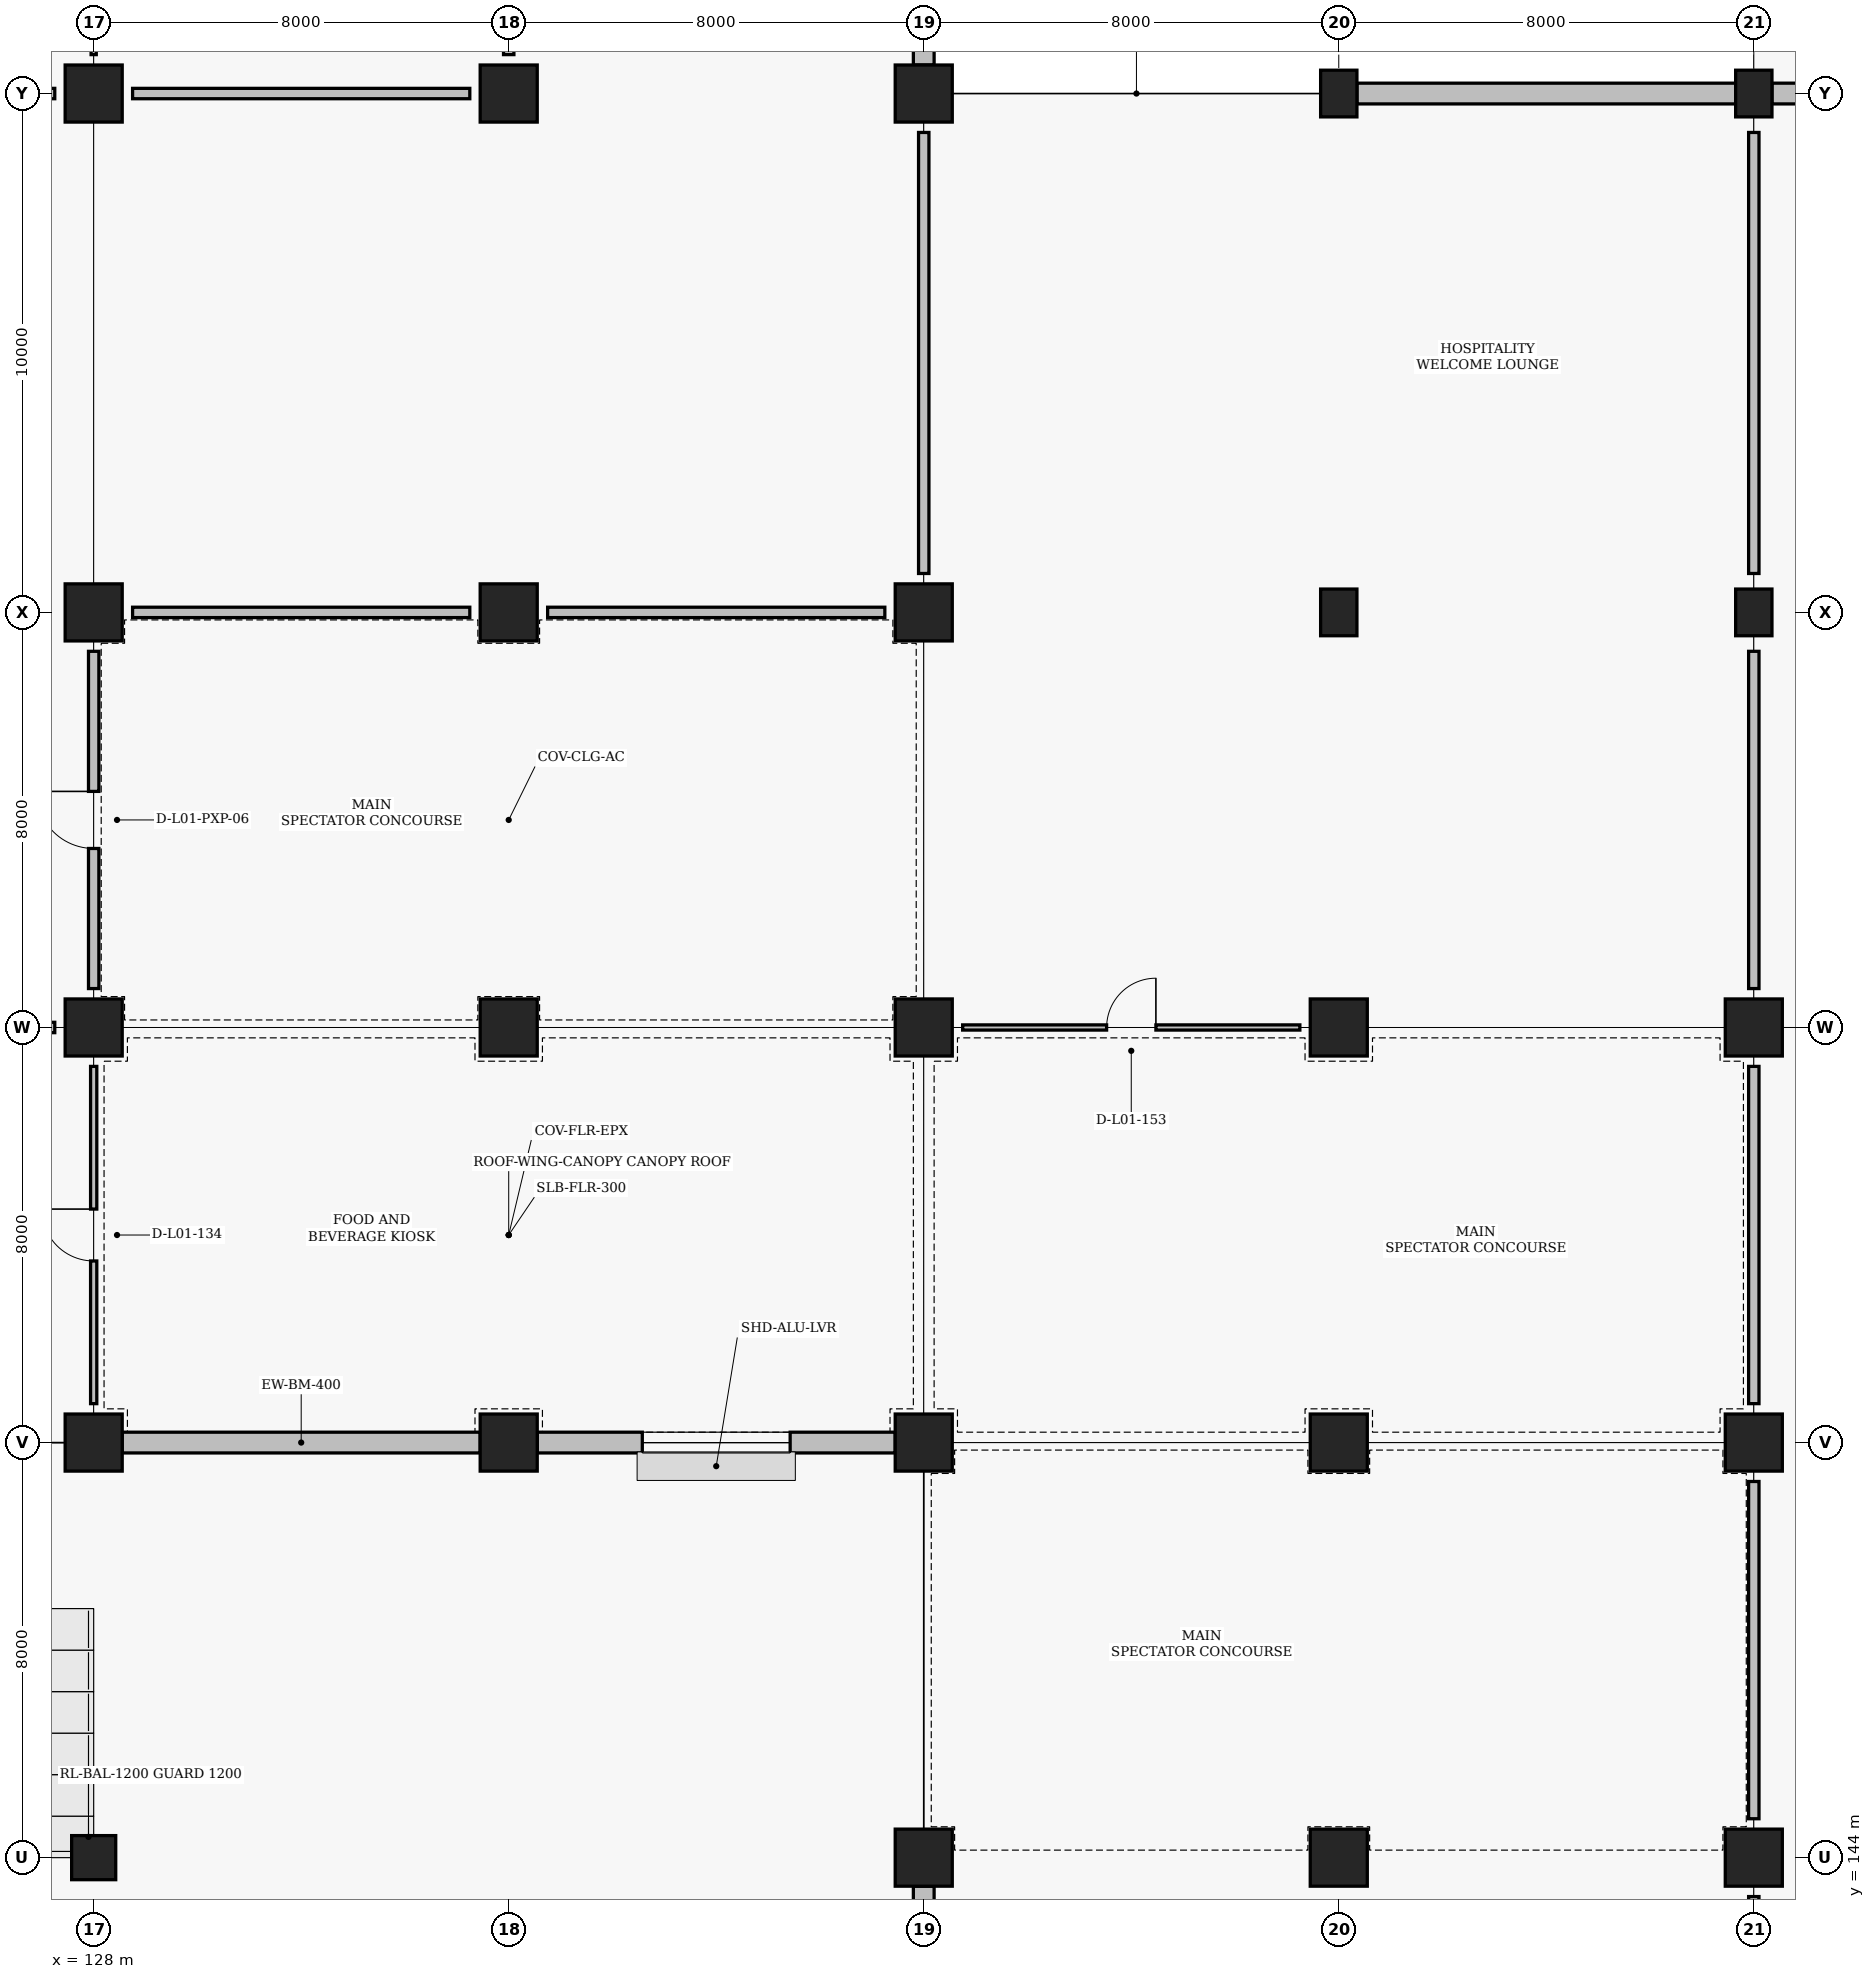
"""IFC4 building model, lengths in metres.
Left out: names, types, materials, properties, quantities, classifications, styles, units other than length and angle.
Written with IfcOpenShell. Run it as: python <this file> out.ifc"""

import sys

from ifc_helpers import new_model, si_unit, direction, frame, frame_2d, origin, origin_2d, place, context, subcontext, project, spatial, rectangle, circle, extrude, element, fill, save


model = new_model("IFC4")
c1 = context("Model", 3, precision=1e-05, world=origin(), true_north=direction((0.0, 1.0)))
c2 = subcontext(c1, "Body", "Model", "MODEL_VIEW")
j1 = project(units=[si_unit("LENGTHUNIT", "METRE"), si_unit("PLANEANGLEUNIT", "RADIAN")], contexts=[c1])
p1 = place(None, origin())
s1 = spatial("IfcSite", under=j1, at=p1, CompositionType="ELEMENT")
p2 = place(p1, origin())
s2 = spatial("IfcBuilding", under=s1, at=p2, CompositionType="ELEMENT")
p3 = place(p2, origin())
s3 = spatial("IfcBuildingStorey", under=s2, at=p3, CompositionType="ELEMENT", Elevation=0.0)
for number, where, z_axis, x_axis in (
    (1, (128.0, 152.0, 0.0), (0.0, 0.0, 1.0), (1.0, 0.0, 0.0)),
    (2, (128.0, 160.0, 0.0), (0.0, 0.0, 1.0), (1.0, 0.0, 0.0)),
    (3, (128.0, 168.0, 0.0), (0.0, 0.0, 1.0), (1.0, 0.0, 0.0)),
    (4, (128.0, 178.0, 0.0), (0.0, 0.0, 1.0), (1.0, 0.0, 0.0)),
    (5, (136.0, 152.0, 0.0), (0.0, 0.0, 1.0), (1.0, 0.0, 0.0)),
    (6, (136.0, 160.0, 0.0), (0.0, 0.0, 1.0), (1.0, 0.0, 0.0)),
    (7, (136.0, 168.0, 0.0), (0.0, 0.0, 1.0), (1.0, 0.0, 0.0)),
    (8, (136.0, 178.0, 0.0), (0.0, 0.0, 1.0), (1.0, 0.0, 0.0)),
    (9, (144.0, 144.0, 0.0), (0.0, 0.0, 1.0), (1.0, 0.0, 0.0)),
    (10, (144.0, 152.0, 0.0), (0.0, 0.0, 1.0), (1.0, 0.0, 0.0)),
    (11, (144.0, 160.0, 0.0), (0.0, 0.0, 1.0), (1.0, 0.0, 0.0)),
    (12, (144.0, 168.0, 0.0), (0.0, 0.0, 1.0), (1.0, 0.0, 0.0)),
    (13, (144.0, 178.0, 0.0), (0.0, 0.0, 1.0), (1.0, 0.0, 0.0)),
    (14, (152.0, 144.0, 0.0), (0.0, 0.0, 1.0), (1.0, 0.0, 0.0)),
    (15, (152.0, 152.0, 0.0), (0.0, 0.0, 1.0), (1.0, 0.0, 0.0)),
    (16, (152.0, 160.0, 0.0), (0.0, 0.0, 1.0), (1.0, 0.0, 0.0)),
):
    element("IfcColumn", number, at=place(p3, frame(where, z_axis=z_axis, x_axis=x_axis)), inside=s3, PredefinedType="COLUMN", context=c2, shape_type="SweptSolid", body=[
        extrude(rectangle(XDim=1.1, YDim=1.1, at=origin_2d()), origin(), (0.0, 0.0, 1.0), 4.8),
    ])
for number, where, z_axis, x_axis in (
    (17, (152.0, 168.0, 0.0), (0.0, 0.0, 1.0), (1.0, 0.0, 0.0)),
    (18, (152.0, 178.0, 0.0), (0.0, 0.0, 1.0), (1.0, 0.0, 0.0)),
):
    element("IfcColumn", number, at=place(p3, frame(where, z_axis=z_axis, x_axis=x_axis)), inside=s3, PredefinedType="COLUMN", context=c2, shape_type="SweptSolid", body=[
        extrude(rectangle(XDim=0.7, YDim=0.9, at=origin_2d()), origin(), (0.0, 0.0, 1.0), 4.8),
    ])
for number, where, z_axis, x_axis in (
    (19, (160.0, 144.0, 0.0), (0.0, 0.0, 1.0), (1.0, 0.0, 0.0)),
    (20, (160.0, 152.0, 0.0), (0.0, 0.0, 1.0), (1.0, 0.0, 0.0)),
    (21, (160.0, 160.0, 0.0), (0.0, 0.0, 1.0), (1.0, 0.0, 0.0)),
):
    element("IfcColumn", number, at=place(p3, frame(where, z_axis=z_axis, x_axis=x_axis)), inside=s3, PredefinedType="COLUMN", context=c2, shape_type="SweptSolid", body=[
        extrude(rectangle(XDim=1.1, YDim=1.1, at=origin_2d()), origin(), (0.0, 0.0, 1.0), 4.8),
    ])
for number, where, z_axis, x_axis in (
    (22, (160.0, 168.0, 0.0), (0.0, 0.0, 1.0), (1.0, 0.0, 0.0)),
    (23, (160.0, 178.0, 0.0), (0.0, 0.0, 1.0), (1.0, 0.0, 0.0)),
):
    element("IfcColumn", number, at=place(p3, frame(where, z_axis=z_axis, x_axis=x_axis)), inside=s3, PredefinedType="COLUMN", context=c2, shape_type="SweptSolid", body=[
        extrude(rectangle(XDim=0.7, YDim=0.9, at=origin_2d()), origin(), (0.0, 0.0, 1.0), 4.8),
    ])
p4 = place(p3, frame((128.0, 144.0, 0.0), z_axis=(0.0, 0.0, 1.0), x_axis=(1.0, 0.0, 0.0)))
e24 = element("IfcColumn", 24, at=p4, inside=s3, PredefinedType="COLUMN", context=c2, shape_type="SweptSolid", body=[
    extrude(circle(Radius=0.425, at=origin_2d()), origin(), (0.0, 0.0, 1.0), 4.8),
])
p5 = place(p3, frame((128.55, 152.0, 0.0), z_axis=(0.0, 0.0, 1.0), x_axis=(1.0, 0.0, 0.0)))
e25 = element("IfcWall", 25, at=p5, inside=s3, PredefinedType="SOLIDWALL", context=c2, shape_type="SweptSolid", body=[
    extrude(rectangle(XDim=6.9, YDim=0.4, at=frame_2d((3.45, 0.0))), origin(), (0.0, 0.0, 1.0), 3.81),
])
p6 = place(p3, frame((136.55, 152.0, 0.0), z_axis=(0.0, 0.0, 1.0), x_axis=(1.0, 0.0, 0.0)))
e26 = element("IfcWall", 26, at=p6, inside=s3, PredefinedType="SOLIDWALL", context=c2, shape_type="SweptSolid", body=[
    extrude(rectangle(XDim=6.9, YDim=0.4, at=frame_2d((3.45, 0.0))), origin(), (0.0, 0.0, 1.0), 3.81),
])
p7 = place(p6, frame((2.025, 0.0, 0.95)))
e27 = element("IfcOpeningElement", 27, at=p7, cuts=e26, PredefinedType="OPENING", context=c2, shape_type="SweptSolid", body=[
    extrude(rectangle(XDim=2.85, YDim=2.1, at=frame_2d((1.425, 1.05))), frame((0.0, 0.21, 0.0), z_axis=(0.0, -1.0, 0.0), x_axis=(1.0, 0.0, 0.0)), (0.0, 0.0, 1.0), 0.42),
])
p8 = place(p3, frame((144.0, 187.7, 0.0), z_axis=(0.0, 0.0, 1.0), x_axis=(0.0, -1.0, 0.0)))
e28 = element("IfcWall", 28, at=p8, inside=s3, PredefinedType="SOLIDWALL", context=c2, shape_type="SweptSolid", body=[
    extrude(rectangle(XDim=9.15, YDim=0.4, at=frame_2d((4.575, 0.0))), origin(), (0.0, 0.0, 1.0), 3.71),
])
p9 = place(p8, frame((3.875, 0.0, 0.0)))
e29 = element("IfcOpeningElement", 29, at=p9, cuts=e28, PredefinedType="OPENING", context=c2, shape_type="SweptSolid", body=[
    extrude(rectangle(XDim=1.4, YDim=2.2, at=frame_2d((0.7, 1.1))), frame((0.0, 0.21, 0.0), z_axis=(0.0, -1.0, 0.0), x_axis=(1.0, 0.0, 0.0)), (0.0, 0.0, 1.0), 0.42),
])
p10 = place(p3, frame((144.0, 136.55, 0.0), z_axis=(0.0, 0.0, 1.0), x_axis=(0.0, 1.0, 0.0)))
e30 = element("IfcWall", 30, at=p10, inside=s3, PredefinedType="SOLIDWALL", context=c2, shape_type="SweptSolid", body=[
    extrude(rectangle(XDim=6.9, YDim=0.4, at=frame_2d((3.45, 0.0))), origin(), (0.0, 0.0, 1.0), 3.66),
])
p11 = place(p3, frame((152.35, 178.0, 0.0), z_axis=(0.0, 0.0, 1.0), x_axis=(1.0, 0.0, 0.0)))
e31 = element("IfcWall", 31, at=p11, inside=s3, PredefinedType="SOLIDWALL", context=c2, shape_type="SweptSolid", body=[
    extrude(rectangle(XDim=7.3, YDim=0.4, at=frame_2d((3.65, 0.0))), origin(), (0.0, 0.0, 1.0), 3.71),
])
p12 = place(p3, frame((160.35, 178.0, 0.0), z_axis=(0.0, 0.0, 1.0), x_axis=(1.0, 0.0, 0.0)))
e32 = element("IfcWall", 32, at=p12, inside=s3, PredefinedType="SOLIDWALL", context=c2, shape_type="SweptSolid", body=[
    extrude(rectangle(XDim=7.3, YDim=0.4, at=frame_2d((3.65, 0.0))), origin(), (0.0, 0.0, 1.0), 3.71),
])
p13 = place(p12, frame((2.95, 0.0, 0.0)))
e33 = element("IfcOpeningElement", 33, at=p13, cuts=e32, PredefinedType="OPENING", context=c2, shape_type="SweptSolid", body=[
    extrude(rectangle(XDim=1.4, YDim=2.2, at=frame_2d((0.7, 1.1))), frame((0.0, 0.21, 0.0), z_axis=(0.0, -1.0, 0.0), x_axis=(1.0, 0.0, 0.0)), (0.0, 0.0, 1.0), 0.42),
])
p14 = place(p3, frame((128.0, 160.75, 0.0), z_axis=(0.0, 0.0, 1.0), x_axis=(0.0, 1.0, 0.0)))
e34 = element("IfcWall", 34, at=p14, inside=s3, PredefinedType="PARTITIONING", context=c2, shape_type="SweptSolid", body=[
    extrude(rectangle(XDim=6.5, YDim=0.2, at=frame_2d((3.25, 0.0))), origin(), (0.0, 0.0, 1.0), 3.81),
])
p15 = place(p14, frame((2.7, 0.0, 0.0)))
e35 = element("IfcOpeningElement", 35, at=p15, cuts=e34, PredefinedType="OPENING", context=c2, shape_type="SweptSolid", body=[
    extrude(rectangle(XDim=1.1, YDim=2.2, at=frame_2d((0.55, 1.1))), frame((0.0, 0.11, 0.0), z_axis=(0.0, -1.0, 0.0), x_axis=(1.0, 0.0, 0.0)), (0.0, 0.0, 1.0), 0.22),
])
p16 = place(p3, frame((120.75, 160.0, 0.0), z_axis=(0.0, 0.0, 1.0), x_axis=(1.0, 0.0, 0.0)))
e36 = element("IfcWall", 36, at=p16, inside=s3, PredefinedType="PARTITIONING", context=c2, shape_type="SweptSolid", body=[
    extrude(rectangle(XDim=6.5, YDim=0.2, at=frame_2d((3.25, 0.0))), origin(), (0.0, 0.0, 1.0), 3.66),
])
for number, where, z_axis, x_axis in (
    (37, (120.75, 178.0, 0.0), (0.0, 0.0, 1.0), (1.0, 0.0, 0.0)),
    (38, (128.75, 168.0, 0.0), (0.0, 0.0, 1.0), (1.0, 0.0, 0.0)),
    (39, (128.75, 178.0, 0.0), (0.0, 0.0, 1.0), (1.0, 0.0, 0.0)),
):
    element("IfcWall", number, at=place(p3, frame(where, z_axis=z_axis, x_axis=x_axis)), inside=s3, PredefinedType="PARTITIONING", context=c2, shape_type="SweptSolid", body=[
        extrude(rectangle(XDim=6.5, YDim=0.2, at=frame_2d((3.25, 0.0))), origin(), (0.0, 0.0, 1.0), 3.91),
    ])
p17 = place(p3, frame((144.0, 168.75, 0.0), z_axis=(0.0, 0.0, 1.0), x_axis=(0.0, 1.0, 0.0)))
e40 = element("IfcWall", 40, at=p17, inside=s3, PredefinedType="PARTITIONING", context=c2, shape_type="SweptSolid", body=[
    extrude(rectangle(XDim=8.5, YDim=0.2, at=frame_2d((4.25, 0.0))), origin(), (0.0, 0.0, 1.0), 3.71),
])
p18 = place(p3, frame((136.75, 168.0, 0.0), z_axis=(0.0, 0.0, 1.0), x_axis=(1.0, 0.0, 0.0)))
e41 = element("IfcWall", 41, at=p18, inside=s3, PredefinedType="PARTITIONING", context=c2, shape_type="SweptSolid", body=[
    extrude(rectangle(XDim=6.5, YDim=0.2, at=frame_2d((3.25, 0.0))), origin(), (0.0, 0.0, 1.0), 3.91),
])
p19 = place(p3, frame((136.0, 178.75, 0.0), z_axis=(0.0, 0.0, 1.0), x_axis=(0.0, 1.0, 0.0)))
e42 = element("IfcWall", 42, at=p19, inside=s3, PredefinedType="PARTITIONING", context=c2, shape_type="SweptSolid", body=[
    extrude(rectangle(XDim=8.5, YDim=0.2, at=frame_2d((4.25, 0.0))), origin(), (0.0, 0.0, 1.0), 3.77),
])
for number, where, z_axis, x_axis in (
    (43, (160.0, 136.75, 0.0), (0.0, 0.0, 1.0), (0.0, 1.0, 0.0)),
    (44, (160.0, 144.75, 0.0), (0.0, 0.0, 1.0), (0.0, 1.0, 0.0)),
    (45, (160.0, 152.75, 0.0), (0.0, 0.0, 1.0), (0.0, 1.0, 0.0)),
    (46, (160.0, 160.75, 0.0), (0.0, 0.0, 1.0), (0.0, 1.0, 0.0)),
):
    element("IfcWall", number, at=place(p3, frame(where, z_axis=z_axis, x_axis=x_axis)), inside=s3, PredefinedType="PARTITIONING", context=c2, shape_type="SweptSolid", body=[
        extrude(rectangle(XDim=6.5, YDim=0.2, at=frame_2d((3.25, 0.0))), origin(), (0.0, 0.0, 1.0), 3.81),
    ])
p20 = place(p3, frame((160.0, 168.75, 0.0), z_axis=(0.0, 0.0, 1.0), x_axis=(0.0, 1.0, 0.0)))
e47 = element("IfcWall", 47, at=p20, inside=s3, PredefinedType="PARTITIONING", context=c2, shape_type="SweptSolid", body=[
    extrude(rectangle(XDim=8.5, YDim=0.2, at=frame_2d((4.25, 0.0))), origin(), (0.0, 0.0, 1.0), 3.71),
])
p21 = place(p3, frame((128.0, 152.75, 0.0), z_axis=(0.0, 0.0, 1.0), x_axis=(0.0, 1.0, 0.0)))
e48 = element("IfcWall", 48, at=p21, inside=s3, PredefinedType="PARTITIONING", context=c2, shape_type="SweptSolid", body=[
    extrude(rectangle(XDim=6.5, YDim=0.12, at=frame_2d((3.25, 0.0))), origin(), (0.0, 0.0, 1.0), 3.81),
])
p22 = place(p21, frame((2.75, 0.0, 0.0)))
e49 = element("IfcOpeningElement", 49, at=p22, cuts=e48, PredefinedType="OPENING", context=c2, shape_type="SweptSolid", body=[
    extrude(rectangle(XDim=1.0, YDim=2.1, at=frame_2d((0.5, 1.05))), frame((0.0, 0.07, 0.0), z_axis=(0.0, -1.0, 0.0), x_axis=(1.0, 0.0, 0.0)), (0.0, 0.0, 1.0), 0.14),
])
p23 = place(p3, frame((128.0, 178.75, 0.0), z_axis=(0.0, 0.0, 1.0), x_axis=(0.0, 1.0, 0.0)))
e50 = element("IfcWall", 50, at=p23, inside=s3, PredefinedType="PARTITIONING", context=c2, shape_type="SweptSolid", body=[
    extrude(rectangle(XDim=8.5, YDim=0.1, at=frame_2d((4.25, 0.0))), origin(), (0.0, 0.0, 1.0), 3.77),
])
p24 = place(p23, frame((3.775, 0.0, 0.0)))
e51 = element("IfcOpeningElement", 51, at=p24, cuts=e50, PredefinedType="OPENING", context=c2, shape_type="SweptSolid", body=[
    extrude(rectangle(XDim=0.95, YDim=2.1, at=frame_2d((0.475, 1.05))), frame((0.0, 0.06, 0.0), z_axis=(0.0, -1.0, 0.0), x_axis=(1.0, 0.0, 0.0)), (0.0, 0.0, 1.0), 0.12),
])
p25 = place(p3, frame((144.75, 160.0, 0.0), z_axis=(0.0, 0.0, 1.0), x_axis=(1.0, 0.0, 0.0)))
e52 = element("IfcWall", 52, at=p25, inside=s3, PredefinedType="PARTITIONING", context=c2, shape_type="SweptSolid", body=[
    extrude(rectangle(XDim=6.5, YDim=0.1, at=frame_2d((3.25, 0.0))), origin(), (0.0, 0.0, 1.0), 3.91),
])
p26 = place(p25, frame((2.775, 0.0, 0.0)))
e53 = element("IfcOpeningElement", 53, at=p26, cuts=e52, PredefinedType="OPENING", context=c2, shape_type="SweptSolid", body=[
    extrude(rectangle(XDim=0.95, YDim=2.1, at=frame_2d((0.475, 1.05))), frame((0.0, 0.06, 0.0), z_axis=(0.0, -1.0, 0.0), x_axis=(1.0, 0.0, 0.0)), (0.0, 0.0, 1.0), 0.12),
])
p27 = place(p7, origin())
e54 = element("IfcWindow", 54, at=p27, inside=s3, PartitioningType="SINGLE_PANEL", PredefinedType="WINDOW", context=c2, shape_type="SweptSolid", body=[
    extrude(rectangle(XDim=2.85, YDim=2.1, at=frame_2d((1.425, 1.05))), frame((0.0, 0.03, 0.0), z_axis=(0.0, -1.0, 0.0), x_axis=(1.0, 0.0, 0.0)), (0.0, 0.0, 1.0), 0.06),
])
fill(e27, e54)
p28 = place(p15, origin())
e55 = element("IfcDoor", 55, at=p28, inside=s3, OperationType="SINGLE_SWING_RIGHT", PredefinedType="DOOR", context=c2, shape_type="SweptSolid", body=[
    extrude(rectangle(XDim=1.1, YDim=2.2, at=frame_2d((0.55, 1.1))), frame((0.0, 0.025, 0.0), z_axis=(0.0, -1.0, 0.0), x_axis=(1.0, 0.0, 0.0)), (0.0, 0.0, 1.0), 0.05),
])
fill(e35, e55)
p29 = place(p22, origin())
e56 = element("IfcDoor", 56, at=p29, inside=s3, OperationType="SINGLE_SWING_RIGHT", PredefinedType="DOOR", context=c2, shape_type="SweptSolid", body=[
    extrude(rectangle(XDim=1.0, YDim=2.1, at=frame_2d((0.5, 1.05))), frame((0.0, 0.025, 0.0), z_axis=(0.0, -1.0, 0.0), x_axis=(1.0, 0.0, 0.0)), (0.0, 0.0, 1.0), 0.05),
])
fill(e49, e56)
p30 = place(p26, origin())
e57 = element("IfcDoor", 57, at=p30, inside=s3, OperationType="SINGLE_SWING_RIGHT", PredefinedType="DOOR", context=c2, shape_type="SweptSolid", body=[
    extrude(rectangle(XDim=0.95, YDim=2.1, at=frame_2d((0.475, 1.05))), frame((0.0, 0.025, 0.0), z_axis=(0.0, -1.0, 0.0), x_axis=(1.0, 0.0, 0.0)), (0.0, 0.0, 1.0), 0.05),
])
fill(e53, e57)
save(model, sys.argv[1])
